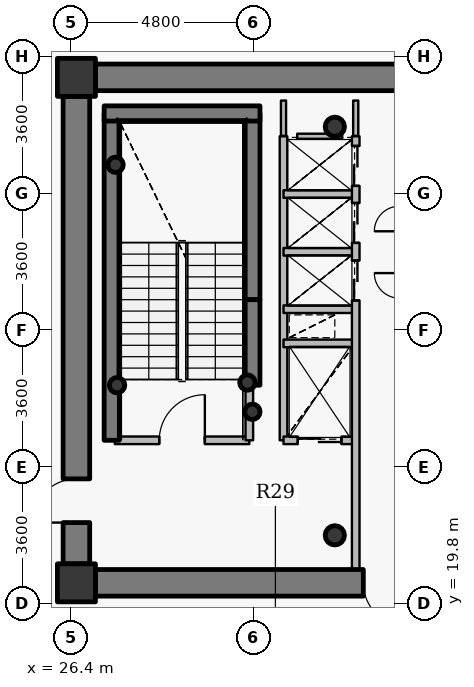
"""IFC4 building model, lengths in metres.
Left out: names, types, materials, properties, quantities, classifications, styles, units other than length and angle.
Written with IfcOpenShell. Run it as: python <this file> out.ifc"""

import sys

from ifc_helpers import new_model, si_unit, direction, frame, frame_2d, origin, origin_2d, place, context, subcontext, project, spatial, rectangle, hollow_circle, extrude, source, transform, mapped, element, fill, save


model = new_model("IFC4")
c1 = context("Model", 3, precision=1e-05, world=origin(), true_north=direction((0.0, 1.0)))
c2 = subcontext(c1, "Body", "Model", "MODEL_VIEW")
j1 = project(units=[si_unit("LENGTHUNIT", "METRE"), si_unit("PLANEANGLEUNIT", "RADIAN")], contexts=[c1])
p1 = place(None, origin())
s1 = spatial("IfcSite", under=j1, at=p1, CompositionType="ELEMENT")
p2 = place(p1, origin())
s2 = spatial("IfcBuilding", under=s1, at=p2, CompositionType="ELEMENT")
p3 = place(p2, frame((0.0, 0.0, 240.3)))
s3 = spatial("IfcBuildingStorey", under=s2, at=p3, CompositionType="ELEMENT", Elevation=240.3)
for number, where, z_axis, x_axis in (
    (1, (26.55, 20.35, 0.0), (0.0, 0.0, 1.0), (1.0, 0.0, 0.0)),
    (2, (26.55, 33.65, 0.0), (0.0, 0.0, 1.0), (1.0, 0.0, 0.0)),
):
    element("IfcColumn", number, at=place(p3, frame(where, z_axis=z_axis, x_axis=x_axis)), inside=s3, PredefinedType="COLUMN", context=c2, shape_type="SweptSolid", body=[
        extrude(rectangle(XDim=1.0, YDim=1.0, at=origin_2d()), origin(), (0.0, 0.0, 1.0), 3.75),
    ])
for number, where, z_axis, x_axis in (
    (3, (33.35, 21.6, 0.0), (0.0, 0.0, 1.0), (1.0, 0.0, 0.0)),
    (4, (33.35, 32.35, 0.0), (0.0, 0.0, 1.0), (1.0, 0.0, 0.0)),
):
    element("IfcColumn", number, at=place(p3, frame(where, z_axis=z_axis, x_axis=x_axis)), inside=s3, PredefinedType="COLUMN", context=c2, shape_type="SweptSolid", body=[
        extrude(hollow_circle(Radius=0.254, WallThickness=0.02, at=origin_2d()), origin(), (0.0, 0.0, 1.0), 3.75),
    ])
p4 = place(p3, frame((27.48, 24.1, 0.0), z_axis=(0.0, 0.0, 1.0), x_axis=(0.0, 1.0, 0.0)))
e5 = element("IfcWall", 5, at=p4, inside=s3, PredefinedType="SHEAR", context=c2, shape_type="SweptSolid", body=[
    extrude(rectangle(XDim=8.6, YDim=0.4, at=frame_2d((4.3, 0.0))), origin(), (0.0, 0.0, 1.0), 3.75),
])
p5 = place(p3, frame((31.18, 27.8, 0.0), z_axis=(0.0, 0.0, 1.0), x_axis=(0.0, 1.0, 0.0)))
e6 = element("IfcWall", 6, at=p5, inside=s3, PredefinedType="SHEAR", context=c2, shape_type="SweptSolid", body=[
    extrude(rectangle(XDim=4.9, YDim=0.4, at=frame_2d((2.45, 0.0))), origin(), (0.0, 0.0, 1.0), 3.75),
])
p6 = place(p3, frame((27.28, 32.7, 0.0), z_axis=(0.0, 0.0, 1.0), x_axis=(1.0, 0.0, 0.0)))
e7 = element("IfcWall", 7, at=p6, inside=s3, PredefinedType="SHEAR", context=c2, shape_type="SweptSolid", body=[
    extrude(rectangle(XDim=4.1, YDim=0.4, at=frame_2d((2.05, 0.0))), origin(), (0.0, 0.0, 1.0), 3.75),
])
for number, where, z_axis, x_axis in (
    (8, (27.58, 31.35, 0.0), (0.0, 0.0, 1.0), (1.0, 0.0, 0.0)),
    (9, (31.05, 25.62, 0.0), (0.0, 0.0, 1.0), (1.0, 0.0, 0.0)),
    (10, (31.18, 24.85, 0.0), (0.0, 0.0, 1.0), (1.0, 0.0, 0.0)),
    (11, (27.62, 25.55, 0.0), (0.0, 0.0, 1.0), (1.0, 0.0, 0.0)),
):
    element("IfcColumn", number, at=place(p3, frame(where, z_axis=z_axis, x_axis=x_axis)), inside=s3, PredefinedType="COLUMN", context=c2, shape_type="SweptSolid", body=[
        extrude(hollow_circle(Radius=0.203, WallThickness=0.016, at=origin_2d()), origin(), (0.0, 0.0, 1.0), 3.75),
    ])
p7 = place(p3, frame((27.05, 33.65, 0.0), z_axis=(0.0, 0.0, 1.0), x_axis=(1.0, 0.0, 0.0)))
e12 = element("IfcWall", 12, at=p7, inside=s3, PredefinedType="SHEAR", context=c2, shape_type="SweptSolid", body=[
    extrude(rectangle(XDim=17.9, YDim=0.7, at=frame_2d((8.95, 0.0))), origin(), (0.0, 0.0, 1.0), 3.05),
])
p8 = place(p7, frame((13.675, 0.0, 0.0)))
e13 = element("IfcOpeningElement", 13, at=p8, cuts=e12, PredefinedType="OPENING", context=c2, shape_type="SweptSolid", body=[
    extrude(rectangle(XDim=1.15, YDim=2.15, at=origin_2d()), frame((0.575, 0.36, 1.075), z_axis=(0.0, -1.0, 0.0), x_axis=(1.0, 0.0, 0.0)), (0.0, 0.0, 1.0), 0.72),
])
p9 = place(p3, frame((44.95, 20.35, 0.0), z_axis=(0.0, 0.0, 1.0), x_axis=(-1.0, 0.0, 0.0)))
e14 = element("IfcWall", 14, at=p9, inside=s3, PredefinedType="SHEAR", context=c2, shape_type="SweptSolid", body=[
    extrude(rectangle(XDim=17.9, YDim=0.7, at=frame_2d((8.95, 0.0))), origin(), (0.0, 0.0, 1.0), 3.05),
])
p10 = place(p9, frame((9.7, 0.0, 0.0)))
e15 = element("IfcOpeningElement", 15, at=p10, cuts=e14, PredefinedType="OPENING", context=c2, shape_type="SweptSolid", body=[
    extrude(rectangle(XDim=1.15, YDim=2.15, at=origin_2d()), frame((0.575, 0.36, 1.075), z_axis=(0.0, -1.0, 0.0), x_axis=(1.0, 0.0, 0.0)), (0.0, 0.0, 1.0), 0.72),
])
p11 = place(p3, frame((26.55, 20.85, 0.0), z_axis=(0.0, 0.0, 1.0), x_axis=(0.0, 1.0, 0.0)))
e16 = element("IfcWall", 16, at=p11, inside=s3, PredefinedType="SHEAR", context=c2, shape_type="SweptSolid", body=[
    extrude(rectangle(XDim=12.3, YDim=0.7, at=frame_2d((6.15, 0.0))), origin(), (0.0, 0.0, 1.0), 3.05),
])
p12 = place(p11, frame((1.085, 0.0, 0.0)))
e17 = element("IfcOpeningElement", 17, at=p12, cuts=e16, PredefinedType="OPENING", context=c2, shape_type="SweptSolid", body=[
    extrude(rectangle(XDim=1.15, YDim=2.15, at=origin_2d()), frame((0.575, 0.36, 1.075), z_axis=(0.0, -1.0, 0.0), x_axis=(1.0, 0.0, 0.0)), (0.0, 0.0, 1.0), 0.72),
])
p13 = place(p3, frame((31.18, 25.55, 0.0), z_axis=(0.0, 0.0, 1.0), x_axis=(0.0, 1.0, 0.0)))
e18 = element("IfcWall", 18, at=p13, inside=s3, PredefinedType="SHEAR", context=c2, shape_type="SweptSolid", body=[
    extrude(rectangle(XDim=2.25, YDim=0.4, at=frame_2d((1.125, 0.0))), origin(), (0.0, 0.0, 1.0), 3.1),
])
p14 = place(p3, frame((27.56, 24.1, 0.0), z_axis=(0.0, 0.0, 1.0), x_axis=(1.0, 0.0, 0.0)))
e19 = element("IfcWall", 19, at=p14, inside=s3, PredefinedType="PARTITIONING", context=c2, shape_type="SweptSolid", body=[
    extrude(rectangle(XDim=3.54, YDim=0.2, at=frame_2d((1.77, 0.0))), origin(), (0.0, 0.0, 1.0), 3.5),
])
p15 = place(p14, frame((1.17, 0.0, 0.0)))
e20 = element("IfcOpeningElement", 20, at=p15, cuts=e19, PredefinedType="OPENING", context=c2, shape_type="SweptSolid", body=[
    extrude(rectangle(XDim=1.2, YDim=2.15, at=origin_2d()), frame((0.6, 0.11, 1.075), z_axis=(0.0, -1.0, 0.0), x_axis=(1.0, 0.0, 0.0)), (0.0, 0.0, 1.0), 0.22),
])
p16 = place(p3, frame((31.1, 24.1, 0.0), z_axis=(0.0, 0.0, 1.0), x_axis=(0.0, 1.0, 0.0)))
e21 = element("IfcWall", 21, at=p16, inside=s3, PredefinedType="PARTITIONING", context=c2, shape_type="SweptSolid", body=[
    extrude(rectangle(XDim=1.44, YDim=0.2, at=frame_2d((0.72, 0.0))), origin(), (0.0, 0.0, 1.0), 3.5),
])
p17 = place(p3, frame((32.0, 24.1, 0.0), z_axis=(0.0, 0.0, 1.0), x_axis=(0.0, 1.0, 0.0)))
e22 = element("IfcWall", 22, at=p17, inside=s3, PredefinedType="PARTITIONING", context=c2, shape_type="SweptSolid", body=[
    extrude(rectangle(XDim=8.0, YDim=0.2, at=frame_2d((4.0, 0.0))), origin(), (0.0, 0.0, 1.0), 3.5),
])
p18 = place(p3, frame((32.0, 24.1, 0.0), z_axis=(0.0, 0.0, 1.0), x_axis=(1.0, 0.0, 0.0)))
e23 = element("IfcWall", 23, at=p18, inside=s3, PredefinedType="PARTITIONING", context=c2, shape_type="SweptSolid", body=[
    extrude(rectangle(XDim=1.9, YDim=0.2, at=frame_2d((0.95, 0.0))), origin(), (0.0, 0.0, 1.0), 3.085),
])
p19 = place(p18, frame((0.375, 0.0, 0.0)))
e24 = element("IfcOpeningElement", 24, at=p19, cuts=e23, PredefinedType="OPENING", context=c2, shape_type="SweptSolid", body=[
    extrude(rectangle(XDim=1.15, YDim=2.15, at=origin_2d()), frame((0.575, 0.11, 1.075), z_axis=(0.0, -1.0, 0.0), x_axis=(1.0, 0.0, 0.0)), (0.0, 0.0, 1.0), 0.22),
])
for number, where, z_axis, x_axis in (
    (25, (32.0, 26.65, 0.0), (0.0, 0.0, 1.0), (1.0, 0.0, 0.0)),
    (26, (32.0, 27.55, 0.0), (0.0, 0.0, 1.0), (1.0, 0.0, 0.0)),
    (27, (32.0, 29.06, 0.0), (0.0, 0.0, 1.0), (1.0, 0.0, 0.0)),
    (28, (32.0, 30.58, 0.0), (0.0, 0.0, 1.0), (1.0, 0.0, 0.0)),
):
    element("IfcWall", number, at=place(p3, frame(where, z_axis=z_axis, x_axis=x_axis)), inside=s3, PredefinedType="PARTITIONING", context=c2, shape_type="SweptSolid", body=[
        extrude(rectangle(XDim=1.9, YDim=0.2, at=frame_2d((0.95, 0.0))), origin(), (0.0, 0.0, 1.0), 3.085),
    ])
p20 = place(p3, frame((33.9, 20.7, 0.0), z_axis=(0.0, 0.0, 1.0), x_axis=(0.0, 1.0, 0.0)))
e29 = element("IfcWall", 29, at=p20, inside=s3, PredefinedType="PARTITIONING", context=c2, shape_type="SweptSolid", body=[
    extrude(rectangle(XDim=11.4, YDim=0.2, at=frame_2d((5.7, 0.0))), origin(), (0.0, 0.0, 1.0), 3.085),
])
p21 = place(p20, frame((7.08, 0.0, 0.0)))
e30 = element("IfcOpeningElement", 30, at=p21, cuts=e29, PredefinedType="OPENING", context=c2, shape_type="SweptSolid", body=[
    extrude(rectangle(XDim=1.05, YDim=2.15, at=origin_2d()), frame((0.525, 0.11, 1.075), z_axis=(0.0, -1.0, 0.0), x_axis=(1.0, 0.0, 0.0)), (0.0, 0.0, 1.0), 0.22),
])
p22 = place(p20, frame((8.595, 0.0, 0.0)))
e31 = element("IfcOpeningElement", 31, at=p22, cuts=e29, PredefinedType="OPENING", context=c2, shape_type="SweptSolid", body=[
    extrude(rectangle(XDim=1.05, YDim=2.15, at=origin_2d()), frame((0.525, 0.11, 1.075), z_axis=(0.0, -1.0, 0.0), x_axis=(1.0, 0.0, 0.0)), (0.0, 0.0, 1.0), 0.22),
])
p23 = place(p20, frame((10.095, 0.0, 0.0)))
e32 = element("IfcOpeningElement", 32, at=p23, cuts=e29, PredefinedType="OPENING", context=c2, shape_type="SweptSolid", body=[
    extrude(rectangle(XDim=1.05, YDim=2.15, at=origin_2d()), frame((0.525, 0.11, 1.075), z_axis=(0.0, -1.0, 0.0), x_axis=(1.0, 0.0, 0.0)), (0.0, 0.0, 1.0), 0.22),
])
p24 = place(p3, frame((32.36, 32.1, 0.0), z_axis=(0.0, 0.0, 1.0), x_axis=(1.0, 0.0, 0.0)))
e33 = element("IfcWall", 33, at=p24, inside=s3, PredefinedType="PARTITIONING", context=c2, shape_type="SweptSolid", body=[
    extrude(rectangle(XDim=1.18, YDim=0.135, at=frame_2d((0.59, 0.0))), origin(), (0.0, 0.0, 1.0), 3.085),
])
p25 = place(p3, frame((32.0, 33.04, 0.0), z_axis=(0.0, 0.0, 1.0), x_axis=(0.0, -1.0, 0.0)))
e34 = element("IfcWall", 34, at=p25, inside=s3, PredefinedType="PARTITIONING", context=c2, shape_type="SweptSolid", body=[
    extrude(rectangle(XDim=0.93, YDim=0.135, at=frame_2d((0.465, 0.0))), origin(), (0.0, 0.0, 1.0), 3.035),
])
p26 = place(p3, frame((33.9, 32.11, 0.0), z_axis=(0.0, 0.0, 1.0), x_axis=(0.0, 1.0, 0.0)))
e35 = element("IfcWall", 35, at=p26, inside=s3, PredefinedType="PARTITIONING", context=c2, shape_type="SweptSolid", body=[
    extrude(rectangle(XDim=0.93, YDim=0.135, at=frame_2d((0.465, 0.0))), origin(), (0.0, 0.0, 1.0), 3.085),
])
p27 = place(p3, frame((27.04, 34.0, 0.0), z_axis=(0.0, 0.0, 1.0), x_axis=(-1.0, 0.0, 0.0)))
e36 = element("IfcWall", 36, at=p27, inside=s3, PredefinedType="PARTITIONING", context=c2, shape_type="SweptSolid", body=[
    extrude(rectangle(XDim=0.84, YDim=0.135, at=frame_2d((0.42, 0.0))), origin(), (0.0, 0.0, 1.0), 2.935),
])
p28 = place(p3, frame((26.2, 33.692, 0.0), z_axis=(0.0, 0.0, 1.0), x_axis=(0.0, -1.0, 0.0)))
e37 = element("IfcWall", 37, at=p28, inside=s3, PredefinedType="PARTITIONING", context=c2, shape_type="SweptSolid", body=[
    extrude(rectangle(XDim=0.532, YDim=0.135, at=frame_2d((0.266, 0.0))), origin(), (0.0, 0.0, 1.0), 3.5),
])
p29 = place(p3, frame((26.2, 20.84, 0.0), z_axis=(0.0, 0.0, 1.0), x_axis=(0.0, -1.0, 0.0)))
e38 = element("IfcWall", 38, at=p29, inside=s3, PredefinedType="PARTITIONING", context=c2, shape_type="SweptSolid", body=[
    extrude(rectangle(XDim=0.84, YDim=0.135, at=frame_2d((0.42, 0.0))), origin(), (0.0, 0.0, 1.0), 3.5),
])
p30 = place(p3, frame((26.508, 20.0, 0.0), z_axis=(0.0, 0.0, 1.0), x_axis=(1.0, 0.0, 0.0)))
e39 = element("IfcWall", 39, at=p30, inside=s3, PredefinedType="PARTITIONING", context=c2, shape_type="SweptSolid", body=[
    extrude(rectangle(XDim=0.532, YDim=0.135, at=frame_2d((0.266, 0.0))), origin(), (0.0, 0.0, 1.0), 2.935),
])
m1 = source(origin(), c2, "Body", "SweptSolid", [
    extrude(rectangle(XDim=1.15, YDim=2.15, at=origin_2d()), frame((0.575, 0.025, 1.075), z_axis=(0.0, -1.0, 0.0), x_axis=(1.0, 0.0, 0.0)), (0.0, 0.0, 1.0), 0.05),
])
p31 = place(p12, origin())
e40 = element("IfcDoor", 40, at=p31, inside=s3, OperationType="SINGLE_SWING_LEFT", PredefinedType="DOOR", context=c2, shape_type="MappedRepresentation", body=[
    mapped(m1, transform((0.0, 0.0, 0.0), x_axis=(1.0, 0.0, 0.0), y_axis=(0.0, 1.0, 0.0), z_axis=(0.0, 0.0, 1.0), scale=1.0)),
])
fill(e17, e40)
p32 = place(p10, origin())
e41 = element("IfcDoor", 41, at=p32, inside=s3, OperationType="SINGLE_SWING_LEFT", PredefinedType="DOOR", context=c2, shape_type="MappedRepresentation", body=[
    mapped(m1, transform((0.0, 0.0, 0.0), x_axis=(1.0, 0.0, 0.0), y_axis=(0.0, 1.0, 0.0), z_axis=(0.0, 0.0, 1.0), scale=1.0)),
])
fill(e15, e41)
m2 = source(origin(), c2, "Body", "SweptSolid", [
    extrude(rectangle(XDim=1.2, YDim=2.15, at=origin_2d()), frame((0.6, 0.025, 1.075), z_axis=(0.0, -1.0, 0.0), x_axis=(1.0, 0.0, 0.0)), (0.0, 0.0, 1.0), 0.05),
])
p33 = place(p15, origin())
e42 = element("IfcDoor", 42, at=p33, inside=s3, OperationType="SINGLE_SWING_RIGHT", PredefinedType="DOOR", context=c2, shape_type="MappedRepresentation", body=[
    mapped(m2, transform((0.0, 0.0, 0.0), x_axis=(1.0, 0.0, 0.0), y_axis=(0.0, 1.0, 0.0), z_axis=(0.0, 0.0, 1.0), scale=1.0)),
])
fill(e20, e42)
m3 = source(origin(), c2, "Body", "SweptSolid", [
    extrude(rectangle(XDim=1.15, YDim=2.15, at=origin_2d()), frame((0.575, 0.025, 1.075), z_axis=(0.0, -1.0, 0.0), x_axis=(1.0, 0.0, 0.0)), (0.0, 0.0, 1.0), 0.05),
])
p34 = place(p19, origin())
e43 = element("IfcDoor", 43, at=p34, inside=s3, OperationType="DOUBLE_DOOR_SLIDING", PredefinedType="USERDEFINED", context=c2, shape_type="MappedRepresentation", body=[
    mapped(m3, transform((0.0, 0.0, 0.0), x_axis=(1.0, 0.0, 0.0), y_axis=(0.0, 1.0, 0.0), z_axis=(0.0, 0.0, 1.0), scale=1.0)),
])
fill(e24, e43)
m4 = source(origin(), c2, "Body", "SweptSolid", [
    extrude(rectangle(XDim=1.05, YDim=2.15, at=origin_2d()), frame((0.525, 0.025, 1.075), z_axis=(0.0, -1.0, 0.0), x_axis=(1.0, 0.0, 0.0)), (0.0, 0.0, 1.0), 0.05),
])
p35 = place(p21, origin())
e44 = element("IfcDoor", 44, at=p35, inside=s3, OperationType="DOUBLE_DOOR_SLIDING", PredefinedType="USERDEFINED", context=c2, shape_type="MappedRepresentation", body=[
    mapped(m4, transform((0.0, 0.0, 0.0), x_axis=(1.0, 0.0, 0.0), y_axis=(0.0, 1.0, 0.0), z_axis=(0.0, 0.0, 1.0), scale=1.0)),
])
fill(e30, e44)
p36 = place(p22, origin())
e45 = element("IfcDoor", 45, at=p36, inside=s3, OperationType="DOUBLE_DOOR_SLIDING", PredefinedType="USERDEFINED", context=c2, shape_type="MappedRepresentation", body=[
    mapped(m4, transform((0.0, 0.0, 0.0), x_axis=(1.0, 0.0, 0.0), y_axis=(0.0, 1.0, 0.0), z_axis=(0.0, 0.0, 1.0), scale=1.0)),
])
fill(e31, e45)
p37 = place(p23, origin())
e46 = element("IfcDoor", 46, at=p37, inside=s3, OperationType="DOUBLE_DOOR_SLIDING", PredefinedType="USERDEFINED", context=c2, shape_type="MappedRepresentation", body=[
    mapped(m4, transform((0.0, 0.0, 0.0), x_axis=(1.0, 0.0, 0.0), y_axis=(0.0, 1.0, 0.0), z_axis=(0.0, 0.0, 1.0), scale=1.0)),
])
fill(e32, e46)
save(model, sys.argv[1])
